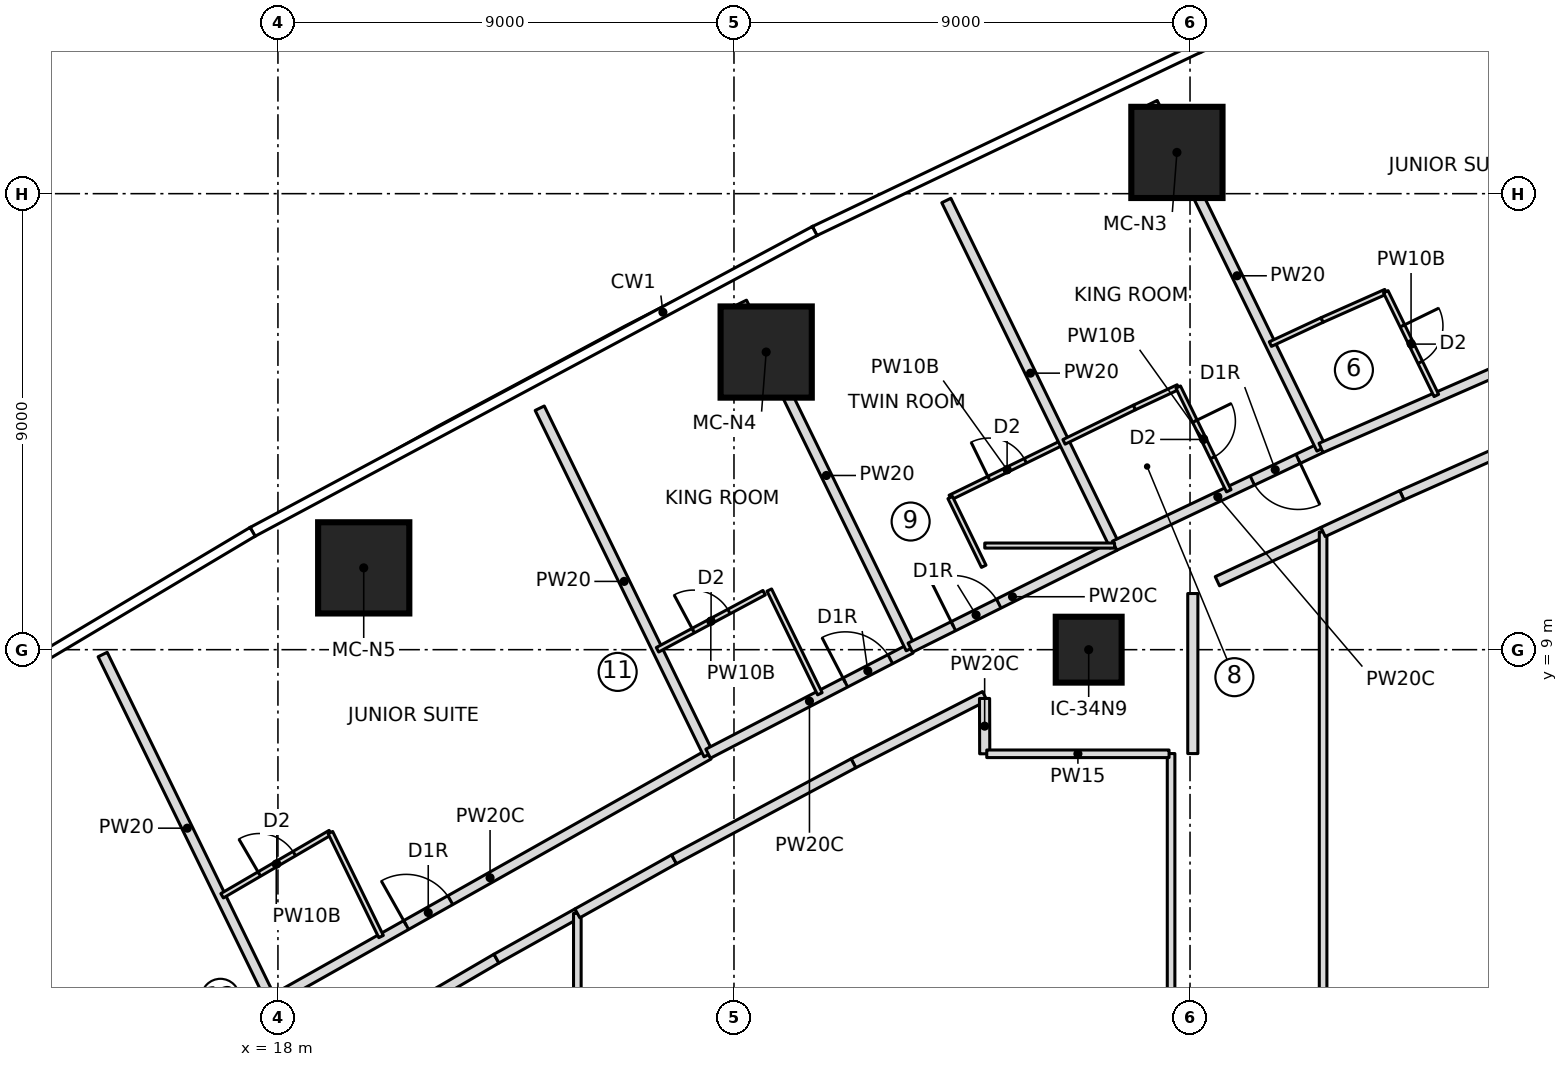
"""IFC4 building model, lengths in metres.
Left out: names, types, materials, properties, quantities, classifications, styles, units other than length and angle.
Written with IfcOpenShell. Run it as: python <this file> out.ifc"""

import sys

from ifc_helpers import new_model, si_unit, direction, frame, frame_2d, origin, origin_2d, place, context, subcontext, project, spatial, rectangle, extrude, element, fill, save


model = new_model("IFC4")
c1 = context("Model", 3, precision=1e-05, world=origin(), true_north=direction((0.0, 1.0)))
c2 = subcontext(c1, "Body", "Model", "MODEL_VIEW")
j1 = project(units=[si_unit("LENGTHUNIT", "METRE"), si_unit("PLANEANGLEUNIT", "RADIAN")], contexts=[c1])
p1 = place(None, origin())
s1 = spatial("IfcSite", under=j1, at=p1, CompositionType="ELEMENT")
p2 = place(p1, origin())
s2 = spatial("IfcBuilding", under=s1, at=p2, CompositionType="ELEMENT")
p3 = place(p2, frame((0.0, 0.0, 43.15)))
s3 = spatial("IfcBuildingStorey", under=s2, at=p3, CompositionType="ELEMENT", Elevation=43.15)
for number, where, z_axis, x_axis in (
    (1, (35.741, 18.814, 0.0), (0.0, 0.0, 1.0), (1.0, 0.0, 0.0)),
    (2, (27.635, 14.874, 0.0), (0.0, 0.0, 1.0), (1.0, 0.0, 0.0)),
    (3, (19.693, 10.615, 0.0), (0.0, 0.0, 1.0), (1.0, 0.0, 0.0)),
):
    element("IfcColumn", number, at=place(p3, frame(where, z_axis=z_axis, x_axis=x_axis)), inside=s3, PredefinedType="COLUMN", context=c2, shape_type="SweptSolid", body=[
        extrude(rectangle(XDim=1.8, YDim=1.8, at=origin_2d()), origin(), (0.0, 0.0, 1.0), 3.55),
    ])
p4 = place(p3, frame((34.0, 9.0, 0.0), z_axis=(0.0, 0.0, 1.0), x_axis=(1.0, 0.0, 0.0)))
e4 = element("IfcColumn", 4, at=p4, inside=s3, PredefinedType="COLUMN", context=c2, shape_type="SweptSolid", body=[
    extrude(rectangle(XDim=1.3, YDim=1.3, at=origin_2d()), origin(), (0.0, 0.0, 1.0), 3.55),
])
p5 = place(p3, frame((17.882, 2.05, 0.0), z_axis=(0.0, 0.0, 1.0), x_axis=(-0.438213564788, 0.898870887078, 0.0)))
e5 = element("IfcWall", 5, at=p5, inside=s3, PredefinedType="PARTITIONING", context=c2, shape_type="SweptSolid", body=[
    extrude(rectangle(XDim=7.625, YDim=0.2, at=frame_2d((3.813, 0.0))), origin(), (0.0, 0.0, 1.0), 3.25),
])
p6 = place(p3, frame((17.874, 2.068, 0.0), z_axis=(0.0, 0.0, 1.0), x_axis=(0.871165632804, 0.490989246544, 0.0)))
e6 = element("IfcWall", 6, at=p6, inside=s3, PredefinedType="PARTITIONING", context=c2, shape_type="SweptSolid", body=[
    extrude(rectangle(XDim=9.901, YDim=0.2, at=frame_2d((4.951, 0.0))), origin(), (0.0, 0.0, 1.0), 3.25),
])
p7 = place(p6, frame((3.05, 0.0, 0.0)))
e7 = element("IfcOpeningElement", 7, at=p7, cuts=e6, PredefinedType="OPENING", context=c2, shape_type="SweptSolid", body=[
    extrude(rectangle(XDim=1.0, YDim=2.1, at=frame_2d((0.5, 1.05))), frame((0.0, 0.11, 0.0), z_axis=(0.0, -1.0, 0.0), x_axis=(1.0, 0.0, 0.0)), (0.0, 0.0, 1.0), 0.22),
])
p8 = place(p3, frame((16.898, 4.144, 0.0), z_axis=(0.0, 0.0, 1.0), x_axis=(0.863707305865, 0.503993739837, 0.0)))
e8 = element("IfcWall", 8, at=p8, inside=s3, PredefinedType="PARTITIONING", context=c2, shape_type="SweptSolid", body=[
    extrude(rectangle(XDim=2.474, YDim=0.1, at=frame_2d((1.237, 0.0))), origin(), (0.0, 0.0, 1.0), 3.25),
])
p9 = place(p8, frame((0.85, 0.0, 0.0)))
e9 = element("IfcOpeningElement", 9, at=p9, cuts=e8, PredefinedType="OPENING", context=c2, shape_type="SweptSolid", body=[
    extrude(rectangle(XDim=0.8, YDim=2.1, at=frame_2d((0.4, 1.05))), frame((0.0, 0.06, 0.0), z_axis=(0.0, -1.0, 0.0), x_axis=(1.0, 0.0, 0.0)), (0.0, 0.0, 1.0), 0.12),
])
p10 = place(p3, frame((19.035, 5.39, 0.0), z_axis=(0.0, 0.0, 1.0), x_axis=(0.438122322582, -0.898915363344, 0.0)))
e10 = element("IfcWall", 10, at=p10, inside=s3, PredefinedType="PARTITIONING", context=c2, shape_type="SweptSolid", body=[
    extrude(rectangle(XDim=2.283, YDim=0.1, at=frame_2d((1.142, 0.0))), origin(), (0.0, 0.0, 1.0), 3.25),
])
p11 = place(p3, frame((26.499, 6.929, 0.0), z_axis=(0.0, 0.0, 1.0), x_axis=(-0.438215539964, 0.898869924146, 0.0)))
e11 = element("IfcWall", 11, at=p11, inside=s3, PredefinedType="PARTITIONING", context=c2, shape_type="SweptSolid", body=[
    extrude(rectangle(XDim=7.605, YDim=0.2, at=frame_2d((3.803, 0.0))), origin(), (0.0, 0.0, 1.0), 3.25),
])
p12 = place(p3, frame((26.49, 6.948, 0.0), z_axis=(0.0, 0.0, 1.0), x_axis=(0.887638836985, 0.460540220911, 0.0)))
e12 = element("IfcWall", 12, at=p12, inside=s3, PredefinedType="PARTITIONING", context=c2, shape_type="SweptSolid", body=[
    extrude(rectangle(XDim=4.504, YDim=0.2, at=frame_2d((2.252, 0.0))), origin(), (0.0, 0.0, 1.0), 3.25),
])
p13 = place(p12, frame((3.05, 0.0, 0.0)))
e13 = element("IfcOpeningElement", 13, at=p13, cuts=e12, PredefinedType="OPENING", context=c2, shape_type="SweptSolid", body=[
    extrude(rectangle(XDim=1.0, YDim=2.1, at=frame_2d((0.5, 1.05))), frame((0.0, 0.11, 0.0), z_axis=(0.0, -1.0, 0.0), x_axis=(1.0, 0.0, 0.0)), (0.0, 0.0, 1.0), 0.22),
])
p14 = place(p3, frame((25.49, 8.998, 0.0), z_axis=(0.0, 0.0, 1.0), x_axis=(0.881666905428, 0.471872300388, 0.0)))
e14 = element("IfcWall", 14, at=p14, inside=s3, PredefinedType="PARTITIONING", context=c2, shape_type="SweptSolid", body=[
    extrude(rectangle(XDim=2.387, YDim=0.1, at=frame_2d((1.194, 0.0))), origin(), (0.0, 0.0, 1.0), 3.25),
])
p15 = place(p14, frame((0.8, 0.0, 0.0)))
e15 = element("IfcOpeningElement", 15, at=p15, cuts=e14, PredefinedType="OPENING", context=c2, shape_type="SweptSolid", body=[
    extrude(rectangle(XDim=0.8, YDim=2.1, at=frame_2d((0.4, 1.05))), frame((0.0, 0.06, 0.0), z_axis=(0.0, -1.0, 0.0), x_axis=(1.0, 0.0, 0.0)), (0.0, 0.0, 1.0), 0.12),
])
p16 = place(p3, frame((27.697, 10.177, 0.0), z_axis=(0.0, 0.0, 1.0), x_axis=(0.438229314017, -0.898863208912, 0.0)))
e16 = element("IfcWall", 16, at=p16, inside=s3, PredefinedType="PARTITIONING", context=c2, shape_type="SweptSolid", body=[
    extrude(rectangle(XDim=2.277, YDim=0.1, at=frame_2d((1.139, 0.0))), origin(), (0.0, 0.0, 1.0), 3.25),
])
p17 = place(p3, frame((30.489, 9.022, 0.0), z_axis=(0.0, 0.0, 1.0), x_axis=(-0.43822365664, 0.898865967072, 0.0)))
e17 = element("IfcWall", 17, at=p17, inside=s3, PredefinedType="PARTITIONING", context=c2, shape_type="SweptSolid", body=[
    extrude(rectangle(XDim=7.601, YDim=0.2, at=frame_2d((3.801, 0.0))), origin(), (0.0, 0.0, 1.0), 3.25),
])
p18 = place(p3, frame((30.48, 9.04, 0.0), z_axis=(0.0, 0.0, 1.0), x_axis=(0.894989913054, 0.446086376761, 0.0)))
e18 = element("IfcWall", 18, at=p18, inside=s3, PredefinedType="PARTITIONING", context=c2, shape_type="SweptSolid", body=[
    extrude(rectangle(XDim=4.506, YDim=0.2, at=frame_2d((2.253, 0.0))), origin(), (0.0, 0.0, 1.0), 3.25),
])
p19 = place(p18, frame((0.95, 0.0, 0.0)))
e19 = element("IfcOpeningElement", 19, at=p19, cuts=e18, PredefinedType="OPENING", context=c2, shape_type="SweptSolid", body=[
    extrude(rectangle(XDim=1.0, YDim=2.1, at=frame_2d((0.5, 1.05))), frame((0.0, 0.11, 0.0), z_axis=(0.0, -1.0, 0.0), x_axis=(1.0, 0.0, 0.0)), (0.0, 0.0, 1.0), 0.22),
])
p20 = place(p3, frame((31.267, 12.003, 0.0), z_axis=(0.0, 0.0, 1.0), x_axis=(0.89845285455, 0.439070003702, 0.0)))
e20 = element("IfcWall", 20, at=p20, inside=s3, PredefinedType="PARTITIONING", context=c2, shape_type="SweptSolid", body=[
    extrude(rectangle(XDim=2.5, YDim=0.1, at=frame_2d((1.25, 0.0))), origin(), (0.0, 0.0, 1.0), 3.25),
])
p21 = place(p20, frame((0.85, 0.0, 0.0)))
e21 = element("IfcOpeningElement", 21, at=p21, cuts=e20, PredefinedType="OPENING", context=c2, shape_type="SweptSolid", body=[
    extrude(rectangle(XDim=0.8, YDim=2.1, at=frame_2d((0.4, 1.05))), frame((0.0, 0.06, 0.0), z_axis=(0.0, -1.0, 0.0), x_axis=(1.0, 0.0, 0.0)), (0.0, 0.0, 1.0), 0.12),
])
p22 = place(p3, frame((31.929, 10.646, 0.0), z_axis=(0.0, 0.0, 1.0), x_axis=(-0.438136931394, 0.898908243008, 0.0)))
e22 = element("IfcWall", 22, at=p22, inside=s3, PredefinedType="PARTITIONING", context=c2, shape_type="SweptSolid", body=[
    extrude(rectangle(XDim=1.51, YDim=0.1, at=frame_2d((0.755, 0.0))), origin(), (0.0, 0.0, 1.0), 3.25),
])
p23 = place(p3, frame((34.513, 11.05, 0.0), z_axis=(0.0, 0.0, 1.0), x_axis=(-0.438187612283, 0.898883538865, 0.0)))
e23 = element("IfcWall", 23, at=p23, inside=s3, PredefinedType="PARTITIONING", context=c2, shape_type="SweptSolid", body=[
    extrude(rectangle(XDim=7.582, YDim=0.2, at=frame_2d((3.791, 0.0))), origin(), (0.0, 0.0, 1.0), 3.25),
])
p24 = place(p3, frame((38.585, 12.981, 0.0), z_axis=(0.0, 0.0, 1.0), x_axis=(-0.903706948966, -0.428151550727, 0.0)))
e24 = element("IfcWall", 24, at=p24, inside=s3, PredefinedType="PARTITIONING", context=c2, shape_type="SweptSolid", body=[
    extrude(rectangle(XDim=4.506, YDim=0.2, at=frame_2d((2.253, 0.0))), origin(), (0.0, 0.0, 1.0), 3.25),
])
p25 = place(p24, frame((0.5, 0.0, 0.0)))
e25 = element("IfcOpeningElement", 25, at=p25, cuts=e24, PredefinedType="OPENING", context=c2, shape_type="SweptSolid", body=[
    extrude(rectangle(XDim=1.0, YDim=2.1, at=frame_2d((0.5, 1.05))), frame((0.0, 0.11, 0.0), z_axis=(0.0, -1.0, 0.0), x_axis=(1.0, 0.0, 0.0)), (0.0, 0.0, 1.0), 0.22),
])
p26 = place(p3, frame((33.513, 13.101, 0.0), z_axis=(0.0, 0.0, 1.0), x_axis=(0.898338680123, 0.439303557685, 0.0)))
e26 = element("IfcWall", 26, at=p26, inside=s3, PredefinedType="PARTITIONING", context=c2, shape_type="SweptSolid", body=[
    extrude(rectangle(XDim=1.547, YDim=0.1, at=frame_2d((0.773, 0.0))), origin(), (0.0, 0.0, 1.0), 3.25),
])
p27 = place(p3, frame((34.903, 13.781, 0.0), z_axis=(0.0, 0.0, 1.0), x_axis=(0.906477304063, 0.422254540791, 0.0)))
e27 = element("IfcWall", 27, at=p27, inside=s3, PredefinedType="PARTITIONING", context=c2, shape_type="SweptSolid", body=[
    extrude(rectangle(XDim=0.953, YDim=0.1, at=frame_2d((0.477, 0.0))), origin(), (0.0, 0.0, 1.0), 3.25),
])
p28 = place(p3, frame((35.767, 14.183, 0.0), z_axis=(0.0, 0.0, 1.0), x_axis=(0.438229314017, -0.898863208912, 0.0)))
e28 = element("IfcWall", 28, at=p28, inside=s3, PredefinedType="PARTITIONING", context=c2, shape_type="SweptSolid", body=[
    extrude(rectangle(XDim=2.277, YDim=0.1, at=frame_2d((1.139, 0.0))), origin(), (0.0, 0.0, 1.0), 3.25),
])
p29 = place(p28, frame((0.75, 0.0, 0.0)))
e29 = element("IfcOpeningElement", 29, at=p29, cuts=e28, PredefinedType="OPENING", context=c2, shape_type="SweptSolid", body=[
    extrude(rectangle(XDim=0.8, YDim=2.1, at=frame_2d((0.4, 1.05))), frame((0.0, 0.06, 0.0), z_axis=(0.0, -1.0, 0.0), x_axis=(1.0, 0.0, 0.0)), (0.0, 0.0, 1.0), 0.12),
])
p30 = place(p3, frame((38.594, 12.963, 0.0), z_axis=(0.0, 0.0, 1.0), x_axis=(-0.438197705697, 0.898878618459, 0.0)))
e30 = element("IfcWall", 30, at=p30, inside=s3, PredefinedType="PARTITIONING", context=c2, shape_type="SweptSolid", body=[
    extrude(rectangle(XDim=7.601, YDim=0.2, at=frame_2d((3.801, 0.0))), origin(), (0.0, 0.0, 1.0), 3.25),
])
p31 = place(p3, frame((46.844, 16.591, 0.0), z_axis=(0.0, 0.0, 1.0), x_axis=(-0.916303988169, -0.400483459415, 0.0)))
e31 = element("IfcWall", 31, at=p31, inside=s3, PredefinedType="PARTITIONING", context=c2, shape_type="SweptSolid", body=[
    extrude(rectangle(XDim=9.013, YDim=0.2, at=frame_2d((4.507, 0.0))), origin(), (0.0, 0.0, 1.0), 3.25),
])
p32 = place(p31, frame((1.05, 0.0, 0.0)))
e32 = element("IfcOpeningElement", 32, at=p32, cuts=e31, PredefinedType="OPENING", context=c2, shape_type="SweptSolid", body=[
    extrude(rectangle(XDim=1.0, YDim=2.1, at=frame_2d((0.5, 1.05))), frame((0.0, 0.11, 0.0), z_axis=(0.0, -1.0, 0.0), x_axis=(1.0, 0.0, 0.0)), (0.0, 0.0, 1.0), 0.22),
])
p33 = place(p3, frame((37.586, 15.031, 0.0), z_axis=(0.0, 0.0, 1.0), x_axis=(0.90632717857, 0.422576673972, 0.0)))
e33 = element("IfcWall", 33, at=p33, inside=s3, PredefinedType="PARTITIONING", context=c2, shape_type="SweptSolid", body=[
    extrude(rectangle(XDim=1.125, YDim=0.1, at=frame_2d((0.563, 0.0))), origin(), (0.0, 0.0, 1.0), 3.25),
])
p34 = place(p3, frame((38.606, 15.507, 0.0), z_axis=(0.0, 0.0, 1.0), x_axis=(0.913972512123, 0.405776104625, 0.0)))
e34 = element("IfcWall", 34, at=p34, inside=s3, PredefinedType="PARTITIONING", context=c2, shape_type="SweptSolid", body=[
    extrude(rectangle(XDim=1.375, YDim=0.1, at=frame_2d((0.688, 0.0))), origin(), (0.0, 0.0, 1.0), 3.25),
])
p35 = place(p3, frame((39.863, 16.065, 0.0), z_axis=(0.0, 0.0, 1.0), x_axis=(0.438233629628, -0.898861104878, 0.0)))
e35 = element("IfcWall", 35, at=p35, inside=s3, PredefinedType="PARTITIONING", context=c2, shape_type="SweptSolid", body=[
    extrude(rectangle(XDim=2.279, YDim=0.1, at=frame_2d((1.139, 0.0))), origin(), (0.0, 0.0, 1.0), 3.25),
])
p36 = place(p35, frame((0.75, 0.0, 0.0)))
e36 = element("IfcOpeningElement", 36, at=p36, cuts=e35, PredefinedType="OPENING", context=c2, shape_type="SweptSolid", body=[
    extrude(rectangle(XDim=0.8, YDim=2.1, at=frame_2d((0.4, 1.05))), frame((0.0, 0.06, 0.0), z_axis=(0.0, -1.0, 0.0), x_axis=(1.0, 0.0, 0.0)), (0.0, 0.0, 1.0), 0.12),
])
p37 = place(p3, frame((18.844, 0.879, 0.0), z_axis=(0.0, 0.0, 1.0), x_axis=(0.863710538269, 0.503988200341, 0.0)))
e37 = element("IfcWall", 37, at=p37, inside=s3, PredefinedType="PARTITIONING", context=c2, shape_type="SweptSolid", body=[
    extrude(rectangle(XDim=4.016, YDim=0.2, at=frame_2d((2.008, 0.0))), origin(), (0.0, 0.0, 1.0), 3.25),
])
p38 = place(p3, frame((22.312, 2.903, 0.0), z_axis=(0.0, 0.0, 1.0), x_axis=(0.872813072418, 0.48805464921, 0.0)))
e38 = element("IfcWall", 38, at=p38, inside=s3, PredefinedType="PARTITIONING", context=c2, shape_type="SweptSolid", body=[
    extrude(rectangle(XDim=1.829, YDim=0.2, at=frame_2d((0.915, 0.0))), origin(), (0.0, 0.0, 1.0), 3.25),
])
p39 = place(p3, frame((23.909, -3.796, 0.0), z_axis=(0.0, 0.0, 1.0), x_axis=(0.0, 1.0, 0.0)))
e39 = element("IfcWall", 39, at=p39, inside=s3, PredefinedType="PARTITIONING", context=c2, shape_type="SweptSolid", body=[
    extrude(rectangle(XDim=7.592, YDim=0.15, at=frame_2d((3.796, 0.0))), origin(), (0.0, 0.0, 1.0), 3.25),
])
p40 = place(p3, frame((29.357, 6.758, 0.0), z_axis=(0.0, 0.0, 1.0), x_axis=(0.890213377055, 0.455543788579, 0.0)))
e40 = element("IfcWall", 40, at=p40, inside=s3, PredefinedType="PARTITIONING", context=c2, shape_type="SweptSolid", body=[
    extrude(rectangle(XDim=2.912, YDim=0.2, at=frame_2d((1.456, 0.0))), origin(), (0.0, 0.0, 1.0), 3.25),
])
p41 = place(p3, frame((23.909, 3.796, 0.0), z_axis=(0.0, 0.0, 1.0), x_axis=(0.872789592901, 0.48809663646, 0.0)))
e41 = element("IfcWall", 41, at=p41, inside=s3, PredefinedType="PARTITIONING", context=c2, shape_type="SweptSolid", body=[
    extrude(rectangle(XDim=2.186, YDim=0.2, at=frame_2d((1.093, 0.0))), origin(), (0.0, 0.0, 1.0), 3.25),
])
p42 = place(p3, frame((25.817, 4.863, 0.0), z_axis=(0.0, 0.0, 1.0), x_axis=(0.881655245922, 0.471894084874, 0.0)))
e42 = element("IfcWall", 42, at=p42, inside=s3, PredefinedType="PARTITIONING", context=c2, shape_type="SweptSolid", body=[
    extrude(rectangle(XDim=4.016, YDim=0.2, at=frame_2d((2.008, 0.0))), origin(), (0.0, 0.0, 1.0), 3.25),
])
p43 = place(p3, frame((35.626, -6.95, 0.0), z_axis=(0.0, 0.0, 1.0), x_axis=(0.0, 1.0, 0.0)))
e43 = element("IfcWall", 43, at=p43, inside=s3, PredefinedType="PARTITIONING", context=c2, shape_type="SweptSolid", body=[
    extrude(rectangle(XDim=13.9, YDim=0.15, at=frame_2d((6.95, 0.0))), origin(), (0.0, 0.0, 1.0), 3.25),
])
p44 = place(p3, frame((36.54, 10.351, 0.0), z_axis=(0.0, 0.0, 1.0), x_axis=(0.906372737018, 0.422478948103, 0.0)))
e44 = element("IfcWall", 44, at=p44, inside=s3, PredefinedType="PARTITIONING", context=c2, shape_type="SweptSolid", body=[
    extrude(rectangle(XDim=2.302, YDim=0.2, at=frame_2d((1.151, 0.0))), origin(), (0.0, 0.0, 1.0), 3.25),
])
p45 = place(p3, frame((38.626, -11.323, 0.0), z_axis=(0.0, 0.0, 1.0), x_axis=(0.0, 1.0, 0.0)))
e45 = element("IfcWall", 45, at=p45, inside=s3, PredefinedType="PARTITIONING", context=c2, shape_type="SweptSolid", body=[
    extrude(rectangle(XDim=22.647, YDim=0.15, at=frame_2d((11.323, 0.0))), origin(), (0.0, 0.0, 1.0), 3.25),
])
p46 = place(p3, frame((40.18, 12.048, 0.0), z_axis=(0.0, 0.0, 1.0), x_axis=(0.913986953061, 0.405743576209, 0.0)))
e46 = element("IfcWall", 46, at=p46, inside=s3, PredefinedType="PARTITIONING", context=c2, shape_type="SweptSolid", body=[
    extrude(rectangle(XDim=4.016, YDim=0.2, at=frame_2d((2.008, 0.0))), origin(), (0.0, 0.0, 1.0), 3.25),
])
p47 = place(p3, frame((38.626, 11.323, 0.0), z_axis=(0.0, 0.0, 1.0), x_axis=(0.906314095157, 0.422604733668, 0.0)))
e47 = element("IfcWall", 47, at=p47, inside=s3, PredefinedType="PARTITIONING", context=c2, shape_type="SweptSolid", body=[
    extrude(rectangle(XDim=1.714, YDim=0.2, at=frame_2d((0.857, 0.0))), origin(), (0.0, 0.0, 1.0), 3.25),
])
p48 = place(p3, frame((34.51, 11.055, 0.0), z_axis=(0.0, 0.0, 1.0), x_axis=(-1.0, 0.0, 0.0)))
e48 = element("IfcWall", 48, at=p48, inside=s3, PredefinedType="PARTITIONING", context=c2, shape_type="SweptSolid", body=[
    extrude(rectangle(XDim=2.562, YDim=0.1, at=frame_2d((1.281, 0.0))), origin(), (0.0, 0.0, 1.0), 3.25),
])
p49 = place(p3, frame((31.945, 8.037, 0.0), z_axis=(0.0, 0.0, 1.0), x_axis=(0.003129875123, -0.999995101929, 0.0)))
e49 = element("IfcWall", 49, at=p49, inside=s3, PredefinedType="PARTITIONING", context=c2, shape_type="SweptSolid", body=[
    extrude(rectangle(XDim=1.092, YDim=0.2, at=frame_2d((0.546, 0.0))), origin(), (0.0, 0.0, 1.0), 3.25),
])
p50 = place(p3, frame((31.989, 6.945, 0.0), z_axis=(0.0, 0.0, 1.0), x_axis=(0.999999997697, -6.786102e-05, 0.0)))
e50 = element("IfcWall", 50, at=p50, inside=s3, PredefinedType="PARTITIONING", context=c2, shape_type="SweptSolid", body=[
    extrude(rectangle(XDim=3.598, YDim=0.15, at=frame_2d((1.799, 0.0))), origin(), (0.0, 0.0, 1.0), 3.25),
])
p51 = place(p3, frame((36.055, 6.949, 0.0), z_axis=(0.0, 0.0, 1.0), x_axis=(0.0, 1.0, 0.0)))
e51 = element("IfcWall", 51, at=p51, inside=s3, PredefinedType="PARTITIONING", context=c2, shape_type="SweptSolid", body=[
    extrude(rectangle(XDim=3.159, YDim=0.2, at=frame_2d((1.58, 0.0))), origin(), (0.0, 0.0, 1.0), 3.25),
])
p52 = place(p9, origin())
e52 = element("IfcDoor", 52, at=p52, inside=s3, OperationType="SINGLE_SWING_LEFT", PredefinedType="DOOR", context=c2, shape_type="SweptSolid", body=[
    extrude(rectangle(XDim=0.8, YDim=2.1, at=frame_2d((0.4, 1.05))), frame((0.0, 0.025, 0.0), z_axis=(0.0, -1.0, 0.0), x_axis=(1.0, 0.0, 0.0)), (0.0, 0.0, 1.0), 0.05),
])
fill(e9, e52)
p53 = place(p7, origin())
e53 = element("IfcDoor", 53, at=p53, inside=s3, OperationType="SINGLE_SWING_RIGHT", PredefinedType="DOOR", context=c2, shape_type="SweptSolid", body=[
    extrude(rectangle(XDim=1.0, YDim=2.1, at=frame_2d((0.5, 1.05))), frame((0.0, 0.025, 0.0), z_axis=(0.0, -1.0, 0.0), x_axis=(1.0, 0.0, 0.0)), (0.0, 0.0, 1.0), 0.05),
])
fill(e7, e53)
p54 = place(p15, origin())
e54 = element("IfcDoor", 54, at=p54, inside=s3, OperationType="SINGLE_SWING_LEFT", PredefinedType="DOOR", context=c2, shape_type="SweptSolid", body=[
    extrude(rectangle(XDim=0.8, YDim=2.1, at=frame_2d((0.4, 1.05))), frame((0.0, 0.025, 0.0), z_axis=(0.0, -1.0, 0.0), x_axis=(1.0, 0.0, 0.0)), (0.0, 0.0, 1.0), 0.05),
])
fill(e15, e54)
p55 = place(p13, origin())
e55 = element("IfcDoor", 55, at=p55, inside=s3, OperationType="SINGLE_SWING_RIGHT", PredefinedType="DOOR", context=c2, shape_type="SweptSolid", body=[
    extrude(rectangle(XDim=1.0, YDim=2.1, at=frame_2d((0.5, 1.05))), frame((0.0, 0.025, 0.0), z_axis=(0.0, -1.0, 0.0), x_axis=(1.0, 0.0, 0.0)), (0.0, 0.0, 1.0), 0.05),
])
fill(e13, e55)
p56 = place(p21, origin())
e56 = element("IfcDoor", 56, at=p56, inside=s3, OperationType="SINGLE_SWING_LEFT", PredefinedType="DOOR", context=c2, shape_type="SweptSolid", body=[
    extrude(rectangle(XDim=0.8, YDim=2.1, at=frame_2d((0.4, 1.05))), frame((0.0, 0.025, 0.0), z_axis=(0.0, -1.0, 0.0), x_axis=(1.0, 0.0, 0.0)), (0.0, 0.0, 1.0), 0.05),
])
fill(e21, e56)
p57 = place(p19, origin())
e57 = element("IfcDoor", 57, at=p57, inside=s3, OperationType="SINGLE_SWING_RIGHT", PredefinedType="DOOR", context=c2, shape_type="SweptSolid", body=[
    extrude(rectangle(XDim=1.0, YDim=2.1, at=frame_2d((0.5, 1.05))), frame((0.0, 0.025, 0.0), z_axis=(0.0, -1.0, 0.0), x_axis=(1.0, 0.0, 0.0)), (0.0, 0.0, 1.0), 0.05),
])
fill(e19, e57)
p58 = place(p29, origin())
e58 = element("IfcDoor", 58, at=p58, inside=s3, OperationType="SINGLE_SWING_LEFT", PredefinedType="DOOR", context=c2, shape_type="SweptSolid", body=[
    extrude(rectangle(XDim=0.8, YDim=2.1, at=frame_2d((0.4, 1.05))), frame((0.0, 0.025, 0.0), z_axis=(0.0, -1.0, 0.0), x_axis=(1.0, 0.0, 0.0)), (0.0, 0.0, 1.0), 0.05),
])
fill(e29, e58)
p59 = place(p25, origin())
e59 = element("IfcDoor", 59, at=p59, inside=s3, OperationType="SINGLE_SWING_RIGHT", PredefinedType="DOOR", context=c2, shape_type="SweptSolid", body=[
    extrude(rectangle(XDim=1.0, YDim=2.1, at=frame_2d((0.5, 1.05))), frame((0.0, 0.025, 0.0), z_axis=(0.0, -1.0, 0.0), x_axis=(1.0, 0.0, 0.0)), (0.0, 0.0, 1.0), 0.05),
])
fill(e25, e59)
p60 = place(p36, origin())
e60 = element("IfcDoor", 60, at=p60, inside=s3, OperationType="SINGLE_SWING_LEFT", PredefinedType="DOOR", context=c2, shape_type="SweptSolid", body=[
    extrude(rectangle(XDim=0.8, YDim=2.1, at=frame_2d((0.4, 1.05))), frame((0.0, 0.025, 0.0), z_axis=(0.0, -1.0, 0.0), x_axis=(1.0, 0.0, 0.0)), (0.0, 0.0, 1.0), 0.05),
])
fill(e36, e60)
save(model, sys.argv[1])
